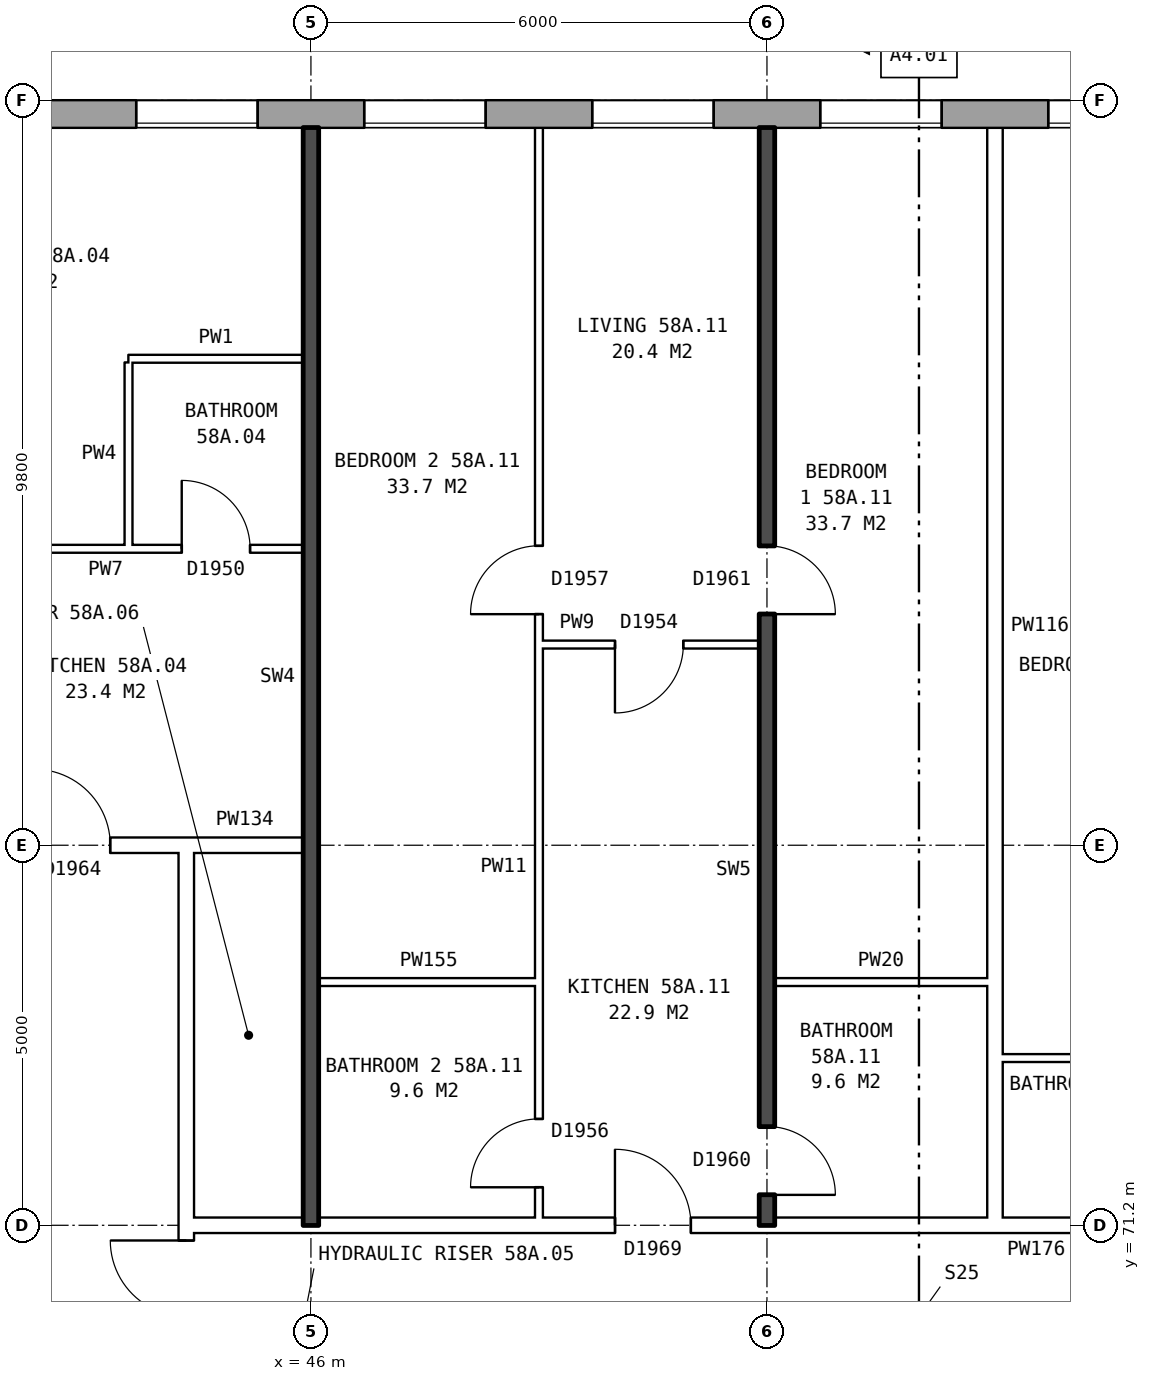
"""IFC4 building model, lengths in metres.
Left out: names, types, materials, properties, quantities, classifications, styles, units other than length and angle.
Written with IfcOpenShell. Run it as: python <this file> out.ifc"""

import sys

from ifc_helpers import new_model, si_unit, direction, frame, frame_2d, origin, place, context, subcontext, project, spatial, rectangle, extrude, element, fill, save


model = new_model("IFC4")
c1 = context("Model", 3, precision=1e-05, world=origin(), true_north=direction((0.0, 1.0)))
c2 = subcontext(c1, "Body", "Model", "MODEL_VIEW")
j1 = project(units=[si_unit("LENGTHUNIT", "METRE"), si_unit("PLANEANGLEUNIT", "RADIAN")], contexts=[c1])
p1 = place(None, origin())
s1 = spatial("IfcSite", under=j1, at=p1, CompositionType="ELEMENT")
p2 = place(p1, origin())
s2 = spatial("IfcBuilding", under=s1, at=p2, CompositionType="ELEMENT")
p3 = place(p2, frame((0.0, 0.0, 205.9)))
s3 = spatial("IfcBuildingStorey", under=s2, at=p3, CompositionType="ELEMENT", Elevation=205.9)
p4 = place(p3, frame((74.95, 85.82, 0.0), z_axis=(0.0, 0.0, 1.0), x_axis=(-1.0, 0.0, 0.0)))
e1 = element("IfcWall", 1, at=p4, inside=s3, PredefinedType="STANDARD", context=c2, shape_type="SweptSolid", body=[
    extrude(rectangle(XDim=39.875, YDim=0.36, at=frame_2d((19.938, 0.0))), origin(), (0.0, 0.0, 1.0), 2.85),
])
p5 = place(p4, frame((0.3, 0.0, 0.8)))
e2 = element("IfcOpeningElement", 2, at=p5, cuts=e1, PredefinedType="OPENING", context=c2, shape_type="SweptSolid", body=[
    extrude(rectangle(XDim=1.0, YDim=1.8, at=frame_2d((0.5, 0.9))), frame((0.0, 0.19, 0.0), z_axis=(0.0, -1.0, 0.0), x_axis=(1.0, 0.0, 0.0)), (0.0, 0.0, 1.0), 0.38),
])
p6 = place(p4, frame((5.65, 0.0, 0.8)))
e3 = element("IfcOpeningElement", 3, at=p6, cuts=e1, PredefinedType="OPENING", context=c2, shape_type="SweptSolid", body=[
    extrude(rectangle(XDim=1.6, YDim=1.8, at=frame_2d((0.8, 0.9))), frame((0.0, 0.19, 0.0), z_axis=(0.0, -1.0, 0.0), x_axis=(1.0, 0.0, 0.0)), (0.0, 0.0, 1.0), 0.38),
])
p7 = place(p4, frame((8.65, 0.0, 0.8)))
e4 = element("IfcOpeningElement", 4, at=p7, cuts=e1, PredefinedType="OPENING", context=c2, shape_type="SweptSolid", body=[
    extrude(rectangle(XDim=1.6, YDim=1.8, at=frame_2d((0.8, 0.9))), frame((0.0, 0.19, 0.0), z_axis=(0.0, -1.0, 0.0), x_axis=(1.0, 0.0, 0.0)), (0.0, 0.0, 1.0), 0.38),
])
p8 = place(p4, frame((11.65, 0.0, 0.8)))
e5 = element("IfcOpeningElement", 5, at=p8, cuts=e1, PredefinedType="OPENING", context=c2, shape_type="SweptSolid", body=[
    extrude(rectangle(XDim=1.6, YDim=1.8, at=frame_2d((0.8, 0.9))), frame((0.0, 0.19, 0.0), z_axis=(0.0, -1.0, 0.0), x_axis=(1.0, 0.0, 0.0)), (0.0, 0.0, 1.0), 0.38),
])
p9 = place(p4, frame((14.65, 0.0, 0.8)))
e6 = element("IfcOpeningElement", 6, at=p9, cuts=e1, PredefinedType="OPENING", context=c2, shape_type="SweptSolid", body=[
    extrude(rectangle(XDim=1.6, YDim=1.8, at=frame_2d((0.8, 0.9))), frame((0.0, 0.19, 0.0), z_axis=(0.0, -1.0, 0.0), x_axis=(1.0, 0.0, 0.0)), (0.0, 0.0, 1.0), 0.38),
])
p10 = place(p4, frame((17.65, 0.0, 0.8)))
e7 = element("IfcOpeningElement", 7, at=p10, cuts=e1, PredefinedType="OPENING", context=c2, shape_type="SweptSolid", body=[
    extrude(rectangle(XDim=1.6, YDim=1.8, at=frame_2d((0.8, 0.9))), frame((0.0, 0.19, 0.0), z_axis=(0.0, -1.0, 0.0), x_axis=(1.0, 0.0, 0.0)), (0.0, 0.0, 1.0), 0.38),
])
p11 = place(p4, frame((20.65, 0.0, 0.8)))
e8 = element("IfcOpeningElement", 8, at=p11, cuts=e1, PredefinedType="OPENING", context=c2, shape_type="SweptSolid", body=[
    extrude(rectangle(XDim=1.6, YDim=1.8, at=frame_2d((0.8, 0.9))), frame((0.0, 0.19, 0.0), z_axis=(0.0, -1.0, 0.0), x_axis=(1.0, 0.0, 0.0)), (0.0, 0.0, 1.0), 0.38),
])
p12 = place(p4, frame((23.65, 0.0, 0.8)))
e9 = element("IfcOpeningElement", 9, at=p12, cuts=e1, PredefinedType="OPENING", context=c2, shape_type="SweptSolid", body=[
    extrude(rectangle(XDim=1.6, YDim=1.8, at=frame_2d((0.8, 0.9))), frame((0.0, 0.19, 0.0), z_axis=(0.0, -1.0, 0.0), x_axis=(1.0, 0.0, 0.0)), (0.0, 0.0, 1.0), 0.38),
])
p13 = place(p4, frame((26.65, 0.0, 0.8)))
e10 = element("IfcOpeningElement", 10, at=p13, cuts=e1, PredefinedType="OPENING", context=c2, shape_type="SweptSolid", body=[
    extrude(rectangle(XDim=1.6, YDim=1.8, at=frame_2d((0.8, 0.9))), frame((0.0, 0.19, 0.0), z_axis=(0.0, -1.0, 0.0), x_axis=(1.0, 0.0, 0.0)), (0.0, 0.0, 1.0), 0.38),
])
p14 = place(p4, frame((29.65, 0.0, 0.8)))
e11 = element("IfcOpeningElement", 11, at=p14, cuts=e1, PredefinedType="OPENING", context=c2, shape_type="SweptSolid", body=[
    extrude(rectangle(XDim=1.6, YDim=1.8, at=frame_2d((0.8, 0.9))), frame((0.0, 0.19, 0.0), z_axis=(0.0, -1.0, 0.0), x_axis=(1.0, 0.0, 0.0)), (0.0, 0.0, 1.0), 0.38),
])
p15 = place(p4, frame((32.65, 0.0, 0.8)))
e12 = element("IfcOpeningElement", 12, at=p15, cuts=e1, PredefinedType="OPENING", context=c2, shape_type="SweptSolid", body=[
    extrude(rectangle(XDim=1.6, YDim=1.8, at=frame_2d((0.8, 0.9))), frame((0.0, 0.19, 0.0), z_axis=(0.0, -1.0, 0.0), x_axis=(1.0, 0.0, 0.0)), (0.0, 0.0, 1.0), 0.38),
])
p16 = place(p4, frame((35.65, 0.0, 0.8)))
e13 = element("IfcOpeningElement", 13, at=p16, cuts=e1, PredefinedType="OPENING", context=c2, shape_type="SweptSolid", body=[
    extrude(rectangle(XDim=1.6, YDim=1.8, at=frame_2d((0.8, 0.9))), frame((0.0, 0.19, 0.0), z_axis=(0.0, -1.0, 0.0), x_axis=(1.0, 0.0, 0.0)), (0.0, 0.0, 1.0), 0.38),
])
p17 = place(p4, frame((3.7, 0.0, 0.8)))
e14 = element("IfcOpeningElement", 14, at=p17, cuts=e1, PredefinedType="OPENING", context=c2, shape_type="SweptSolid", body=[
    extrude(rectangle(XDim=1.0, YDim=1.8, at=frame_2d((0.5, 0.9))), frame((0.0, 0.19, 0.0), z_axis=(0.0, -1.0, 0.0), x_axis=(1.0, 0.0, 0.0)), (0.0, 0.0, 1.0), 0.38),
])
p18 = place(p3, frame((44.36, 63.9, 0.0), z_axis=(0.0, 0.0, 1.0), x_axis=(0.0, 1.0, 0.0)))
e15 = element("IfcWall", 15, at=p18, inside=s3, PredefinedType="PARTITIONING", context=c2, shape_type="SweptSolid", body=[
    extrude(rectangle(XDim=12.2, YDim=0.2, at=frame_2d((6.1, 0.0))), origin(), (0.0, 0.0, 1.0), 2.85),
])
p19 = place(p18, frame((5.1, 0.0, 0.0)))
e16 = element("IfcOpeningElement", 16, at=p19, cuts=e15, PredefinedType="OPENING", context=c2, shape_type="SweptSolid", body=[
    extrude(rectangle(XDim=2.0, YDim=2.1, at=frame_2d((1.0, 1.05))), frame((0.0, 0.11, 0.0), z_axis=(0.0, -1.0, 0.0), x_axis=(1.0, 0.0, 0.0)), (0.0, 0.0, 1.0), 0.22),
])
p20 = place(p3, frame((44.36, 71.2, 0.0), z_axis=(0.0, 0.0, 1.0), x_axis=(1.0, 0.0, 0.0)))
e17 = element("IfcWall", 17, at=p20, inside=s3, PredefinedType="PARTITIONING", context=c2, shape_type="SweptSolid", body=[
    extrude(rectangle(XDim=19.28, YDim=0.2, at=frame_2d((9.64, 0.0))), origin(), (0.0, 0.0, 1.0), 2.85),
])
p21 = place(p20, frame((14.64, 0.0, 0.0)))
e18 = element("IfcOpeningElement", 18, at=p21, cuts=e17, PredefinedType="OPENING", context=c2, shape_type="SweptSolid", body=[
    extrude(rectangle(XDim=1.0, YDim=2.1, at=frame_2d((0.5, 1.05))), frame((0.0, 0.11, 0.0), z_axis=(0.0, -1.0, 0.0), x_axis=(1.0, 0.0, 0.0)), (0.0, 0.0, 1.0), 0.22),
])
p22 = place(p20, frame((5.64, 0.0, 0.0)))
e19 = element("IfcOpeningElement", 19, at=p22, cuts=e17, PredefinedType="OPENING", context=c2, shape_type="SweptSolid", body=[
    extrude(rectangle(XDim=1.0, YDim=2.1, at=frame_2d((0.5, 1.05))), frame((0.0, 0.11, 0.0), z_axis=(0.0, -1.0, 0.0), x_axis=(1.0, 0.0, 0.0)), (0.0, 0.0, 1.0), 0.22),
])
p23 = place(p3, frame((55.1, 73.4, 0.0), z_axis=(0.0, 0.0, 1.0), x_axis=(1.0, 0.0, 0.0)))
e20 = element("IfcWall", 20, at=p23, inside=s3, PredefinedType="PARTITIONING", context=c2, shape_type="SweptSolid", body=[
    extrude(rectangle(XDim=2.8, YDim=0.1, at=frame_2d((1.4, 0.0))), origin(), (0.0, 0.0, 1.0), 2.85),
])
p24 = place(p3, frame((46.1, 74.4, 0.0), z_axis=(0.0, 0.0, 1.0), x_axis=(1.0, 0.0, 0.0)))
e21 = element("IfcWall", 21, at=p24, inside=s3, PredefinedType="PARTITIONING", context=c2, shape_type="SweptSolid", body=[
    extrude(rectangle(XDim=2.9, YDim=0.1, at=frame_2d((1.45, 0.0))), origin(), (0.0, 0.0, 1.0), 2.85),
])
p25 = place(p3, frame((52.1, 74.4, 0.0), z_axis=(0.0, 0.0, 1.0), x_axis=(1.0, 0.0, 0.0)))
e22 = element("IfcWall", 22, at=p25, inside=s3, PredefinedType="PARTITIONING", context=c2, shape_type="SweptSolid", body=[
    extrude(rectangle(XDim=2.8, YDim=0.1, at=frame_2d((1.4, 0.0))), origin(), (0.0, 0.0, 1.0), 2.85),
])
p26 = place(p3, frame((41.36, 76.2, 0.0), z_axis=(0.0, 0.0, 1.0), x_axis=(1.0, 0.0, 0.0)))
e23 = element("IfcWall", 23, at=p26, inside=s3, PredefinedType="PARTITIONING", context=c2, shape_type="SweptSolid", body=[
    extrude(rectangle(XDim=3.0, YDim=0.2, at=frame_2d((1.5, 0.0))), origin(), (0.0, 0.0, 1.0), 2.85),
])
p27 = place(p26, frame((1.0, 0.0, 0.0)))
e24 = element("IfcOpeningElement", 24, at=p27, cuts=e23, PredefinedType="OPENING", context=c2, shape_type="SweptSolid", body=[
    extrude(rectangle(XDim=1.0, YDim=2.1, at=frame_2d((0.5, 1.05))), frame((0.0, 0.11, 0.0), z_axis=(0.0, -1.0, 0.0), x_axis=(1.0, 0.0, 0.0)), (0.0, 0.0, 1.0), 0.22),
])
p28 = place(p3, frame((44.36, 76.2, 0.0), z_axis=(0.0, 0.0, 1.0), x_axis=(1.0, 0.0, 0.0)))
e25 = element("IfcWall", 25, at=p28, inside=s3, PredefinedType="PARTITIONING", context=c2, shape_type="SweptSolid", body=[
    extrude(rectangle(XDim=1.54, YDim=0.2, at=frame_2d((0.77, 0.0))), origin(), (0.0, 0.0, 1.0), 2.85),
])
p29 = place(p3, frame((49.0, 78.84, 0.0), z_axis=(0.0, 0.0, 1.0), x_axis=(1.0, 0.0, 0.0)))
e26 = element("IfcWall", 26, at=p29, inside=s3, PredefinedType="PARTITIONING", context=c2, shape_type="SweptSolid", body=[
    extrude(rectangle(XDim=2.9, YDim=0.1, at=frame_2d((1.45, 0.0))), origin(), (0.0, 0.0, 1.0), 2.85),
])
p30 = place(p29, frame((1.0, 0.0, 0.0)))
e27 = element("IfcOpeningElement", 27, at=p30, cuts=e26, PredefinedType="OPENING", context=c2, shape_type="SweptSolid", body=[
    extrude(rectangle(XDim=0.9, YDim=2.1, at=frame_2d((0.45, 1.05))), frame((0.0, 0.06, 0.0), z_axis=(0.0, -1.0, 0.0), x_axis=(1.0, 0.0, 0.0)), (0.0, 0.0, 1.0), 0.12),
])
p31 = place(p3, frame((40.1, 80.1, 0.0), z_axis=(0.0, 0.0, 1.0), x_axis=(1.0, 0.0, 0.0)))
e28 = element("IfcWall", 28, at=p31, inside=s3, PredefinedType="PARTITIONING", context=c2, shape_type="SweptSolid", body=[
    extrude(rectangle(XDim=5.8, YDim=0.1, at=frame_2d((2.9, 0.0))), origin(), (0.0, 0.0, 1.0), 2.85),
])
p32 = place(p31, frame((1.3, 0.0, 0.0)))
e29 = element("IfcOpeningElement", 29, at=p32, cuts=e28, PredefinedType="OPENING", context=c2, shape_type="SweptSolid", body=[
    extrude(rectangle(XDim=0.9, YDim=2.1, at=frame_2d((0.45, 1.05))), frame((0.0, 0.06, 0.0), z_axis=(0.0, -1.0, 0.0), x_axis=(1.0, 0.0, 0.0)), (0.0, 0.0, 1.0), 0.12),
])
p33 = place(p31, frame((4.2, 0.0, 0.0)))
e30 = element("IfcOpeningElement", 30, at=p33, cuts=e28, PredefinedType="OPENING", context=c2, shape_type="SweptSolid", body=[
    extrude(rectangle(XDim=0.9, YDim=2.1, at=frame_2d((0.45, 1.05))), frame((0.0, 0.06, 0.0), z_axis=(0.0, -1.0, 0.0), x_axis=(1.0, 0.0, 0.0)), (0.0, 0.0, 1.0), 0.12),
])
p34 = place(p3, frame((43.6, 82.6, 0.0), z_axis=(0.0, 0.0, 1.0), x_axis=(1.0, 0.0, 0.0)))
e31 = element("IfcWall", 31, at=p34, inside=s3, PredefinedType="PARTITIONING", context=c2, shape_type="SweptSolid", body=[
    extrude(rectangle(XDim=2.3, YDim=0.1, at=frame_2d((1.15, 0.0))), origin(), (0.0, 0.0, 1.0), 2.85),
])
p35 = place(p3, frame((43.6, 80.15, 0.0), z_axis=(0.0, 0.0, 1.0), x_axis=(0.0, 1.0, 0.0)))
e32 = element("IfcWall", 32, at=p35, inside=s3, PredefinedType="PARTITIONING", context=c2, shape_type="SweptSolid", body=[
    extrude(rectangle(XDim=2.4, YDim=0.1, at=frame_2d((1.2, 0.0))), origin(), (0.0, 0.0, 1.0), 2.85),
])
p36 = place(p3, frame((46.0, 71.2, 0.0), z_axis=(0.0, 0.0, 1.0), x_axis=(0.0, 1.0, 0.0)))
e33 = element("IfcWall", 33, at=p36, inside=s3, PredefinedType="SOLIDWALL", context=c2, shape_type="SweptSolid", body=[
    extrude(rectangle(XDim=14.44, YDim=0.2, at=frame_2d((7.22, 0.0))), origin(), (0.0, 0.0, 1.0), 2.85),
])
p37 = place(p3, frame((49.0, 71.3, 0.0), z_axis=(0.0, 0.0, 1.0), x_axis=(0.0, 1.0, 0.0)))
e34 = element("IfcWall", 34, at=p37, inside=s3, PredefinedType="PARTITIONING", context=c2, shape_type="SweptSolid", body=[
    extrude(rectangle(XDim=14.34, YDim=0.1, at=frame_2d((7.17, 0.0))), origin(), (0.0, 0.0, 1.0), 2.85),
])
p38 = place(p37, frame((7.94, 0.0, 0.0)))
e35 = element("IfcOpeningElement", 35, at=p38, cuts=e34, PredefinedType="OPENING", context=c2, shape_type="SweptSolid", body=[
    extrude(rectangle(XDim=0.9, YDim=2.1, at=frame_2d((0.45, 1.05))), frame((0.0, 0.06, 0.0), z_axis=(0.0, -1.0, 0.0), x_axis=(1.0, 0.0, 0.0)), (0.0, 0.0, 1.0), 0.12),
])
p39 = place(p37, frame((0.4, 0.0, 0.0)))
e36 = element("IfcOpeningElement", 36, at=p39, cuts=e34, PredefinedType="OPENING", context=c2, shape_type="SweptSolid", body=[
    extrude(rectangle(XDim=0.9, YDim=2.1, at=frame_2d((0.45, 1.05))), frame((0.0, 0.06, 0.0), z_axis=(0.0, -1.0, 0.0), x_axis=(1.0, 0.0, 0.0)), (0.0, 0.0, 1.0), 0.12),
])
p40 = place(p3, frame((52.0, 71.2, 0.0), z_axis=(0.0, 0.0, 1.0), x_axis=(0.0, 1.0, 0.0)))
e37 = element("IfcWall", 37, at=p40, inside=s3, PredefinedType="SOLIDWALL", context=c2, shape_type="SweptSolid", body=[
    extrude(rectangle(XDim=14.44, YDim=0.2, at=frame_2d((7.22, 0.0))), origin(), (0.0, 0.0, 1.0), 2.85),
])
p41 = place(p40, frame((8.04, 0.0, 0.0)))
e38 = element("IfcOpeningElement", 38, at=p41, cuts=e37, PredefinedType="OPENING", context=c2, shape_type="SweptSolid", body=[
    extrude(rectangle(XDim=0.9, YDim=2.1, at=frame_2d((0.45, 1.05))), frame((0.0, 0.11, 0.0), z_axis=(0.0, -1.0, 0.0), x_axis=(1.0, 0.0, 0.0)), (0.0, 0.0, 1.0), 0.22),
])
p42 = place(p40, frame((0.4, 0.0, 0.0)))
e39 = element("IfcOpeningElement", 39, at=p42, cuts=e37, PredefinedType="OPENING", context=c2, shape_type="SweptSolid", body=[
    extrude(rectangle(XDim=0.9, YDim=2.1, at=frame_2d((0.45, 1.05))), frame((0.0, 0.11, 0.0), z_axis=(0.0, -1.0, 0.0), x_axis=(1.0, 0.0, 0.0)), (0.0, 0.0, 1.0), 0.22),
])
p43 = place(p3, frame((55.0, 71.3, 0.0), z_axis=(0.0, 0.0, 1.0), x_axis=(0.0, 1.0, 0.0)))
e40 = element("IfcWall", 40, at=p43, inside=s3, PredefinedType="PARTITIONING", context=c2, shape_type="SweptSolid", body=[
    extrude(rectangle(XDim=14.34, YDim=0.2, at=frame_2d((7.17, 0.0))), origin(), (0.0, 0.0, 1.0), 2.85),
])
p44 = place(p10, origin())
e41 = element("IfcWindow", 41, at=p44, inside=s3, PartitioningType="SINGLE_PANEL", PredefinedType="WINDOW", context=c2, shape_type="SweptSolid", body=[
    extrude(rectangle(XDim=1.6, YDim=1.8, at=frame_2d((0.8, 0.9))), frame((0.0, 0.15, 0.0), z_axis=(0.0, -1.0, 0.0), x_axis=(1.0, 0.0, 0.0)), (0.0, 0.0, 1.0), 0.06),
])
fill(e7, e41)
p45 = place(p11, origin())
e42 = element("IfcWindow", 42, at=p45, inside=s3, PartitioningType="SINGLE_PANEL", PredefinedType="WINDOW", context=c2, shape_type="SweptSolid", body=[
    extrude(rectangle(XDim=1.6, YDim=1.8, at=frame_2d((0.8, 0.9))), frame((0.0, 0.15, 0.0), z_axis=(0.0, -1.0, 0.0), x_axis=(1.0, 0.0, 0.0)), (0.0, 0.0, 1.0), 0.06),
])
fill(e8, e42)
p46 = place(p12, origin())
e43 = element("IfcWindow", 43, at=p46, inside=s3, PartitioningType="SINGLE_PANEL", PredefinedType="WINDOW", context=c2, shape_type="SweptSolid", body=[
    extrude(rectangle(XDim=1.6, YDim=1.8, at=frame_2d((0.8, 0.9))), frame((0.0, 0.15, 0.0), z_axis=(0.0, -1.0, 0.0), x_axis=(1.0, 0.0, 0.0)), (0.0, 0.0, 1.0), 0.06),
])
fill(e9, e43)
p47 = place(p13, origin())
e44 = element("IfcWindow", 44, at=p47, inside=s3, PartitioningType="SINGLE_PANEL", PredefinedType="WINDOW", context=c2, shape_type="SweptSolid", body=[
    extrude(rectangle(XDim=1.6, YDim=1.8, at=frame_2d((0.8, 0.9))), frame((0.0, 0.15, 0.0), z_axis=(0.0, -1.0, 0.0), x_axis=(1.0, 0.0, 0.0)), (0.0, 0.0, 1.0), 0.06),
])
fill(e10, e44)
p48 = place(p14, origin())
e45 = element("IfcWindow", 45, at=p48, inside=s3, PartitioningType="SINGLE_PANEL", PredefinedType="WINDOW", context=c2, shape_type="SweptSolid", body=[
    extrude(rectangle(XDim=1.6, YDim=1.8, at=frame_2d((0.8, 0.9))), frame((0.0, 0.15, 0.0), z_axis=(0.0, -1.0, 0.0), x_axis=(1.0, 0.0, 0.0)), (0.0, 0.0, 1.0), 0.06),
])
fill(e11, e45)
p49 = place(p19, origin())
e46 = element("IfcDoor", 46, at=p49, inside=s3, OperationType="DOUBLE_DOOR_SINGLE_SWING", PredefinedType="DOOR", context=c2, shape_type="SweptSolid", body=[
    extrude(rectangle(XDim=2.0, YDim=2.1, at=frame_2d((1.0, 1.05))), frame((0.0, 0.025, 0.0), z_axis=(0.0, -1.0, 0.0), x_axis=(1.0, 0.0, 0.0)), (0.0, 0.0, 1.0), 0.05),
])
fill(e16, e46)
p50 = place(p27, origin())
e47 = element("IfcDoor", 47, at=p50, inside=s3, OperationType="SINGLE_SWING_LEFT", PredefinedType="DOOR", context=c2, shape_type="SweptSolid", body=[
    extrude(rectangle(XDim=1.0, YDim=2.1, at=frame_2d((0.5, 1.05))), frame((0.0, 0.025, 0.0), z_axis=(0.0, -1.0, 0.0), x_axis=(1.0, 0.0, 0.0)), (0.0, 0.0, 1.0), 0.05),
])
fill(e24, e47)
p51 = place(p33, origin())
e48 = element("IfcDoor", 48, at=p51, inside=s3, OperationType="SINGLE_SWING_LEFT", PredefinedType="DOOR", context=c2, shape_type="SweptSolid", body=[
    extrude(rectangle(XDim=0.9, YDim=2.1, at=frame_2d((0.45, 1.05))), frame((0.0, 0.025, 0.0), z_axis=(0.0, -1.0, 0.0), x_axis=(1.0, 0.0, 0.0)), (0.0, 0.0, 1.0), 0.05),
])
fill(e30, e48)
p52 = place(p41, frame((0.9, 0.0, 0.0), z_axis=(0.0, 0.0, 1.0), x_axis=(-1.0, 0.0, 0.0)))
e49 = element("IfcDoor", 49, at=p52, inside=s3, OperationType="SINGLE_SWING_RIGHT", PredefinedType="DOOR", context=c2, shape_type="SweptSolid", body=[
    extrude(rectangle(XDim=0.9, YDim=2.1, at=frame_2d((0.45, 1.05))), frame((0.0, 0.025, 0.0), z_axis=(0.0, -1.0, 0.0), x_axis=(1.0, 0.0, 0.0)), (0.0, 0.0, 1.0), 0.05),
])
fill(e38, e49)
p53 = place(p38, origin())
e50 = element("IfcDoor", 50, at=p53, inside=s3, OperationType="SINGLE_SWING_LEFT", PredefinedType="DOOR", context=c2, shape_type="SweptSolid", body=[
    extrude(rectangle(XDim=0.9, YDim=2.1, at=frame_2d((0.45, 1.05))), frame((0.0, 0.025, 0.0), z_axis=(0.0, -1.0, 0.0), x_axis=(1.0, 0.0, 0.0)), (0.0, 0.0, 1.0), 0.05),
])
fill(e35, e50)
p54 = place(p22, origin())
e51 = element("IfcDoor", 51, at=p54, inside=s3, OperationType="SINGLE_SWING_LEFT", PredefinedType="DOOR", context=c2, shape_type="SweptSolid", body=[
    extrude(rectangle(XDim=1.0, YDim=2.1, at=frame_2d((0.5, 1.05))), frame((0.0, 0.025, 0.0), z_axis=(0.0, -1.0, 0.0), x_axis=(1.0, 0.0, 0.0)), (0.0, 0.0, 1.0), 0.05),
])
fill(e19, e51)
p55 = place(p30, frame((0.9, 0.0, 0.0), z_axis=(0.0, 0.0, 1.0), x_axis=(-1.0, 0.0, 0.0)))
e52 = element("IfcDoor", 52, at=p55, inside=s3, OperationType="SINGLE_SWING_RIGHT", PredefinedType="DOOR", context=c2, shape_type="SweptSolid", body=[
    extrude(rectangle(XDim=0.9, YDim=2.1, at=frame_2d((0.45, 1.05))), frame((0.0, 0.025, 0.0), z_axis=(0.0, -1.0, 0.0), x_axis=(1.0, 0.0, 0.0)), (0.0, 0.0, 1.0), 0.05),
])
fill(e27, e52)
p56 = place(p42, frame((0.9, 0.0, 0.0), z_axis=(0.0, 0.0, 1.0), x_axis=(-1.0, 0.0, 0.0)))
e53 = element("IfcDoor", 53, at=p56, inside=s3, OperationType="SINGLE_SWING_RIGHT", PredefinedType="DOOR", context=c2, shape_type="SweptSolid", body=[
    extrude(rectangle(XDim=0.9, YDim=2.1, at=frame_2d((0.45, 1.05))), frame((0.0, 0.025, 0.0), z_axis=(0.0, -1.0, 0.0), x_axis=(1.0, 0.0, 0.0)), (0.0, 0.0, 1.0), 0.05),
])
fill(e39, e53)
p57 = place(p39, origin())
e54 = element("IfcDoor", 54, at=p57, inside=s3, OperationType="SINGLE_SWING_LEFT", PredefinedType="DOOR", context=c2, shape_type="SweptSolid", body=[
    extrude(rectangle(XDim=0.9, YDim=2.1, at=frame_2d((0.45, 1.05))), frame((0.0, 0.025, 0.0), z_axis=(0.0, -1.0, 0.0), x_axis=(1.0, 0.0, 0.0)), (0.0, 0.0, 1.0), 0.05),
])
fill(e36, e54)
save(model, sys.argv[1])
